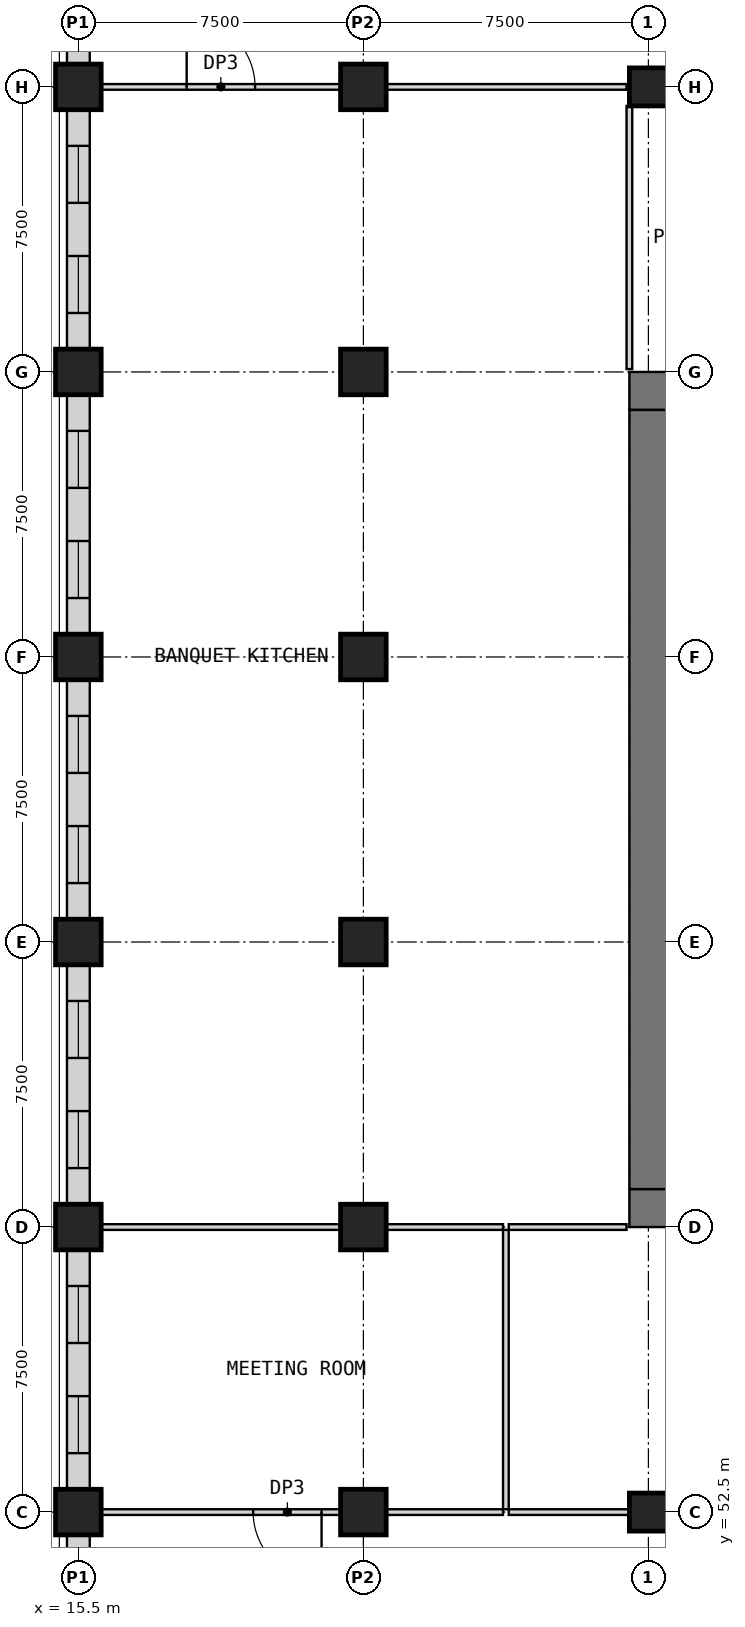
"""IFC4 building model, lengths in metres.
Left out: names, types, materials, properties, quantities, classifications, styles, units other than length and angle.
Written with IfcOpenShell. Run it as: python <this file> out.ifc"""

import sys

from ifc_helpers import new_model, si_unit, direction, frame, frame_2d, origin, origin_2d, place, context, subcontext, project, spatial, rectangle, extrude, element, fill, save


model = new_model("IFC4")
c1 = context("Model", 3, precision=1e-05, world=origin(), true_north=direction((0.0, 1.0)))
c2 = subcontext(c1, "Body", "Model", "MODEL_VIEW")
j1 = project(units=[si_unit("LENGTHUNIT", "METRE"), si_unit("PLANEANGLEUNIT", "RADIAN")], contexts=[c1])
p1 = place(None, origin())
s1 = spatial("IfcSite", under=j1, at=p1, CompositionType="ELEMENT")
p2 = place(p1, origin())
s2 = spatial("IfcBuilding", under=s1, at=p2, CompositionType="ELEMENT")
p3 = place(p2, frame((0.0, 0.0, 23.5)))
s3 = spatial("IfcBuildingStorey", under=s2, at=p3, CompositionType="ELEMENT", Elevation=23.5)
for number, where, z_axis, x_axis in (
    (1, (30.5, 52.5, 0.0), (0.0, 0.0, 1.0), (1.0, 0.0, 0.0)),
    (2, (30.5, 90.0, 0.0), (0.0, 0.0, 1.0), (1.0, 0.0, 0.0)),
):
    element("IfcColumn", number, at=place(p3, frame(where, z_axis=z_axis, x_axis=x_axis)), inside=s3, PredefinedType="COLUMN", context=c2, shape_type="SweptSolid", body=[
        extrude(rectangle(XDim=1.0, YDim=1.0, at=origin_2d()), origin(), (0.0, 0.0, 1.0), 5.5),
    ])
for number, where, z_axis, x_axis in (
    (3, (15.5, 52.5, 0.0), (0.0, 0.0, 1.0), (1.0, 0.0, 0.0)),
    (4, (15.5, 60.0, 0.0), (0.0, 0.0, 1.0), (1.0, 0.0, 0.0)),
    (5, (15.5, 67.5, 0.0), (0.0, 0.0, 1.0), (1.0, 0.0, 0.0)),
    (6, (15.5, 75.0, 0.0), (0.0, 0.0, 1.0), (1.0, 0.0, 0.0)),
    (7, (15.5, 82.5, 0.0), (0.0, 0.0, 1.0), (1.0, 0.0, 0.0)),
    (8, (15.5, 90.0, 0.0), (0.0, 0.0, 1.0), (1.0, 0.0, 0.0)),
    (9, (23.0, 52.5, 0.0), (0.0, 0.0, 1.0), (1.0, 0.0, 0.0)),
    (10, (23.0, 60.0, 0.0), (0.0, 0.0, 1.0), (1.0, 0.0, 0.0)),
    (11, (23.0, 67.5, 0.0), (0.0, 0.0, 1.0), (1.0, 0.0, 0.0)),
    (12, (23.0, 75.0, 0.0), (0.0, 0.0, 1.0), (1.0, 0.0, 0.0)),
    (13, (23.0, 82.5, 0.0), (0.0, 0.0, 1.0), (1.0, 0.0, 0.0)),
    (14, (23.0, 90.0, 0.0), (0.0, 0.0, 1.0), (1.0, 0.0, 0.0)),
):
    element("IfcColumn", number, at=place(p3, frame(where, z_axis=z_axis, x_axis=x_axis)), inside=s3, PredefinedType="COLUMN", context=c2, shape_type="SweptSolid", body=[
        extrude(rectangle(XDim=1.2, YDim=1.2, at=origin_2d()), origin(), (0.0, 0.0, 1.0), 5.5),
    ])
p4 = place(p3, frame((30.0, 60.5, 0.0), z_axis=(0.0, 0.0, 1.0), x_axis=(1.0, 0.0, 0.0)))
e15 = element("IfcWall", 15, at=p4, inside=s3, PredefinedType="SHEAR", context=c2, shape_type="SweptSolid", body=[
    extrude(rectangle(XDim=30.0, YDim=1.0, at=frame_2d((15.0, 0.0))), origin(), (0.0, 0.0, 1.0), 5.5),
])
p5 = place(p4, frame((21.9, 0.0, 0.0)))
e16 = element("IfcOpeningElement", 16, at=p5, cuts=e15, PredefinedType="OPENING", context=c2, shape_type="SweptSolid", body=[
    extrude(rectangle(XDim=1.8, YDim=2.1, at=frame_2d((0.9, 1.05))), frame((0.0, 0.51, 0.0), z_axis=(0.0, -1.0, 0.0), x_axis=(1.0, 0.0, 0.0)), (0.0, 0.0, 1.0), 1.02),
])
p6 = place(p4, frame((26.5, 0.0, 0.0)))
e17 = element("IfcOpeningElement", 17, at=p6, cuts=e15, PredefinedType="OPENING", context=c2, shape_type="SweptSolid", body=[
    extrude(rectangle(XDim=1.2, YDim=2.1, at=frame_2d((0.6, 1.05))), frame((0.0, 0.51, 0.0), z_axis=(0.0, -1.0, 0.0), x_axis=(1.0, 0.0, 0.0)), (0.0, 0.0, 1.0), 1.02),
])
p7 = place(p3, frame((30.0, 82.0, 0.0), z_axis=(0.0, 0.0, 1.0), x_axis=(1.0, 0.0, 0.0)))
e18 = element("IfcWall", 18, at=p7, inside=s3, PredefinedType="SHEAR", context=c2, shape_type="SweptSolid", body=[
    extrude(rectangle(XDim=30.0, YDim=1.0, at=frame_2d((15.0, 0.0))), origin(), (0.0, 0.0, 1.0), 5.5),
])
p8 = place(p3, frame((30.5, 61.0, 0.0), z_axis=(0.0, 0.0, 1.0), x_axis=(0.0, 1.0, 0.0)))
e19 = element("IfcWall", 19, at=p8, inside=s3, PredefinedType="SHEAR", context=c2, shape_type="SweptSolid", body=[
    extrude(rectangle(XDim=20.5, YDim=1.0, at=frame_2d((10.25, 0.0))), origin(), (0.0, 0.0, 1.0), 5.5),
])
p9 = place(p3, frame((22.4, 52.5, 0.0), z_axis=(0.0, 0.0, 1.0), x_axis=(-1.0, 0.0, 0.0)))
e20 = element("IfcWall", 20, at=p9, inside=s3, PredefinedType="PARTITIONING", context=c2, shape_type="SweptSolid", body=[
    extrude(rectangle(XDim=6.3, YDim=0.15, at=frame_2d((3.15, 0.0))), origin(), (0.0, 0.0, 1.0), 5.2),
])
p10 = place(p9, frame((0.5, 0.0, 0.0)))
e21 = element("IfcOpeningElement", 21, at=p10, cuts=e20, PredefinedType="OPENING", context=c2, shape_type="SweptSolid", body=[
    extrude(rectangle(XDim=1.8, YDim=2.4, at=frame_2d((0.9, 1.2))), frame((0.0, 0.085, 0.0), z_axis=(0.0, -1.0, 0.0), x_axis=(1.0, 0.0, 0.0)), (0.0, 0.0, 1.0), 0.17),
])
p11 = place(p3, frame((23.6, 52.5, 0.0), z_axis=(0.0, 0.0, 1.0), x_axis=(1.0, 0.0, 0.0)))
e22 = element("IfcWall", 22, at=p11, inside=s3, PredefinedType="PARTITIONING", context=c2, shape_type="SweptSolid", body=[
    extrude(rectangle(XDim=3.075, YDim=0.15, at=frame_2d((1.538, 0.0))), origin(), (0.0, 0.0, 1.0), 5.2),
])
p12 = place(p3, frame((26.825, 52.5, 0.0), z_axis=(0.0, 0.0, 1.0), x_axis=(1.0, 0.0, 0.0)))
e23 = element("IfcWall", 23, at=p12, inside=s3, PredefinedType="PARTITIONING", context=c2, shape_type="SweptSolid", body=[
    extrude(rectangle(XDim=3.175, YDim=0.15, at=frame_2d((1.587, 0.0))), origin(), (0.0, 0.0, 1.0), 5.2),
])
p13 = place(p3, frame((16.1, 60.0, 0.0), z_axis=(0.0, 0.0, 1.0), x_axis=(1.0, 0.0, 0.0)))
e24 = element("IfcWall", 24, at=p13, inside=s3, PredefinedType="PARTITIONING", context=c2, shape_type="SweptSolid", body=[
    extrude(rectangle(XDim=6.3, YDim=0.15, at=frame_2d((3.15, 0.0))), origin(), (0.0, 0.0, 1.0), 5.2),
])
p14 = place(p3, frame((23.6, 60.0, 0.0), z_axis=(0.0, 0.0, 1.0), x_axis=(1.0, 0.0, 0.0)))
e25 = element("IfcWall", 25, at=p14, inside=s3, PredefinedType="PARTITIONING", context=c2, shape_type="SweptSolid", body=[
    extrude(rectangle(XDim=3.075, YDim=0.15, at=frame_2d((1.538, 0.0))), origin(), (0.0, 0.0, 1.0), 5.2),
])
p15 = place(p3, frame((26.825, 60.0, 0.0), z_axis=(0.0, 0.0, 1.0), x_axis=(1.0, 0.0, 0.0)))
e26 = element("IfcWall", 26, at=p15, inside=s3, PredefinedType="PARTITIONING", context=c2, shape_type="SweptSolid", body=[
    extrude(rectangle(XDim=3.1, YDim=0.15, at=frame_2d((1.55, 0.0))), origin(), (0.0, 0.0, 1.0), 5.2),
])
p16 = place(p3, frame((16.1, 90.0, 0.0), z_axis=(0.0, 0.0, 1.0), x_axis=(1.0, 0.0, 0.0)))
e27 = element("IfcWall", 27, at=p16, inside=s3, PredefinedType="PARTITIONING", context=c2, shape_type="SweptSolid", body=[
    extrude(rectangle(XDim=6.3, YDim=0.15, at=frame_2d((3.15, 0.0))), origin(), (0.0, 0.0, 1.0), 5.2),
])
p17 = place(p16, frame((2.25, 0.0, 0.0)))
e28 = element("IfcOpeningElement", 28, at=p17, cuts=e27, PredefinedType="OPENING", context=c2, shape_type="SweptSolid", body=[
    extrude(rectangle(XDim=1.8, YDim=2.4, at=frame_2d((0.9, 1.2))), frame((0.0, 0.085, 0.0), z_axis=(0.0, -1.0, 0.0), x_axis=(1.0, 0.0, 0.0)), (0.0, 0.0, 1.0), 0.17),
])
p18 = place(p3, frame((23.6, 90.0, 0.0), z_axis=(0.0, 0.0, 1.0), x_axis=(1.0, 0.0, 0.0)))
e29 = element("IfcWall", 29, at=p18, inside=s3, PredefinedType="PARTITIONING", context=c2, shape_type="SweptSolid", body=[
    extrude(rectangle(XDim=6.325, YDim=0.15, at=frame_2d((3.163, 0.0))), origin(), (0.0, 0.0, 1.0), 5.2),
])
p19 = place(p3, frame((15.5, 46.1, 0.0), z_axis=(0.0, 0.0, 1.0), x_axis=(0.0, 1.0, 0.0)))
e30 = element("IfcWall", 30, at=p19, inside=s3, PredefinedType="PARTITIONING", context=c2, shape_type="SweptSolid", body=[
    extrude(rectangle(XDim=5.8, YDim=0.6, at=frame_2d((2.9, 0.0))), origin(), (0.0, 0.0, 1.0), 4.6),
])
p20 = place(p19, frame((0.816, 0.0, 0.9)))
e31 = element("IfcOpeningElement", 31, at=p20, cuts=e30, PredefinedType="OPENING", context=c2, shape_type="SweptSolid", body=[
    extrude(rectangle(XDim=1.5, YDim=2.8, at=frame_2d((0.75, 1.4))), frame((0.0, 0.31, 0.0), z_axis=(0.0, -1.0, 0.0), x_axis=(1.0, 0.0, 0.0)), (0.0, 0.0, 1.0), 0.62),
])
p21 = place(p19, frame((3.484, 0.0, 0.9)))
e32 = element("IfcOpeningElement", 32, at=p21, cuts=e30, PredefinedType="OPENING", context=c2, shape_type="SweptSolid", body=[
    extrude(rectangle(XDim=1.5, YDim=2.8, at=frame_2d((0.75, 1.4))), frame((0.0, 0.31, 0.0), z_axis=(0.0, -1.0, 0.0), x_axis=(1.0, 0.0, 0.0)), (0.0, 0.0, 1.0), 0.62),
])
p22 = place(p3, frame((15.5, 53.1, 0.0), z_axis=(0.0, 0.0, 1.0), x_axis=(0.0, 1.0, 0.0)))
e33 = element("IfcWall", 33, at=p22, inside=s3, PredefinedType="PARTITIONING", context=c2, shape_type="SweptSolid", body=[
    extrude(rectangle(XDim=6.3, YDim=0.6, at=frame_2d((3.15, 0.0))), origin(), (0.0, 0.0, 1.0), 4.6),
])
p23 = place(p22, frame((0.951, 0.0, 0.9)))
e34 = element("IfcOpeningElement", 34, at=p23, cuts=e33, PredefinedType="OPENING", context=c2, shape_type="SweptSolid", body=[
    extrude(rectangle(XDim=1.5, YDim=2.8, at=frame_2d((0.75, 1.4))), frame((0.0, 0.31, 0.0), z_axis=(0.0, -1.0, 0.0), x_axis=(1.0, 0.0, 0.0)), (0.0, 0.0, 1.0), 0.62),
])
p24 = place(p22, frame((3.849, 0.0, 0.9)))
e35 = element("IfcOpeningElement", 35, at=p24, cuts=e33, PredefinedType="OPENING", context=c2, shape_type="SweptSolid", body=[
    extrude(rectangle(XDim=1.5, YDim=2.8, at=frame_2d((0.75, 1.4))), frame((0.0, 0.31, 0.0), z_axis=(0.0, -1.0, 0.0), x_axis=(1.0, 0.0, 0.0)), (0.0, 0.0, 1.0), 0.62),
])
p25 = place(p3, frame((15.5, 60.6, 0.0), z_axis=(0.0, 0.0, 1.0), x_axis=(0.0, 1.0, 0.0)))
e36 = element("IfcWall", 36, at=p25, inside=s3, PredefinedType="PARTITIONING", context=c2, shape_type="SweptSolid", body=[
    extrude(rectangle(XDim=6.3, YDim=0.6, at=frame_2d((3.15, 0.0))), origin(), (0.0, 0.0, 1.0), 4.6),
])
p26 = place(p25, frame((0.951, 0.0, 0.9)))
e37 = element("IfcOpeningElement", 37, at=p26, cuts=e36, PredefinedType="OPENING", context=c2, shape_type="SweptSolid", body=[
    extrude(rectangle(XDim=1.5, YDim=2.8, at=frame_2d((0.75, 1.4))), frame((0.0, 0.31, 0.0), z_axis=(0.0, -1.0, 0.0), x_axis=(1.0, 0.0, 0.0)), (0.0, 0.0, 1.0), 0.62),
])
p27 = place(p25, frame((3.849, 0.0, 0.9)))
e38 = element("IfcOpeningElement", 38, at=p27, cuts=e36, PredefinedType="OPENING", context=c2, shape_type="SweptSolid", body=[
    extrude(rectangle(XDim=1.5, YDim=2.8, at=frame_2d((0.75, 1.4))), frame((0.0, 0.31, 0.0), z_axis=(0.0, -1.0, 0.0), x_axis=(1.0, 0.0, 0.0)), (0.0, 0.0, 1.0), 0.62),
])
p28 = place(p3, frame((15.5, 68.1, 0.0), z_axis=(0.0, 0.0, 1.0), x_axis=(0.0, 1.0, 0.0)))
e39 = element("IfcWall", 39, at=p28, inside=s3, PredefinedType="PARTITIONING", context=c2, shape_type="SweptSolid", body=[
    extrude(rectangle(XDim=6.3, YDim=0.6, at=frame_2d((3.15, 0.0))), origin(), (0.0, 0.0, 1.0), 4.6),
])
p29 = place(p28, frame((0.951, 0.0, 0.9)))
e40 = element("IfcOpeningElement", 40, at=p29, cuts=e39, PredefinedType="OPENING", context=c2, shape_type="SweptSolid", body=[
    extrude(rectangle(XDim=1.5, YDim=2.8, at=frame_2d((0.75, 1.4))), frame((0.0, 0.31, 0.0), z_axis=(0.0, -1.0, 0.0), x_axis=(1.0, 0.0, 0.0)), (0.0, 0.0, 1.0), 0.62),
])
p30 = place(p28, frame((3.849, 0.0, 0.9)))
e41 = element("IfcOpeningElement", 41, at=p30, cuts=e39, PredefinedType="OPENING", context=c2, shape_type="SweptSolid", body=[
    extrude(rectangle(XDim=1.5, YDim=2.8, at=frame_2d((0.75, 1.4))), frame((0.0, 0.31, 0.0), z_axis=(0.0, -1.0, 0.0), x_axis=(1.0, 0.0, 0.0)), (0.0, 0.0, 1.0), 0.62),
])
p31 = place(p3, frame((15.5, 75.6, 0.0), z_axis=(0.0, 0.0, 1.0), x_axis=(0.0, 1.0, 0.0)))
e42 = element("IfcWall", 42, at=p31, inside=s3, PredefinedType="PARTITIONING", context=c2, shape_type="SweptSolid", body=[
    extrude(rectangle(XDim=6.3, YDim=0.6, at=frame_2d((3.15, 0.0))), origin(), (0.0, 0.0, 1.0), 4.6),
])
p32 = place(p31, frame((0.951, 0.0, 0.9)))
e43 = element("IfcOpeningElement", 43, at=p32, cuts=e42, PredefinedType="OPENING", context=c2, shape_type="SweptSolid", body=[
    extrude(rectangle(XDim=1.5, YDim=2.8, at=frame_2d((0.75, 1.4))), frame((0.0, 0.31, 0.0), z_axis=(0.0, -1.0, 0.0), x_axis=(1.0, 0.0, 0.0)), (0.0, 0.0, 1.0), 0.62),
])
p33 = place(p31, frame((3.849, 0.0, 0.9)))
e44 = element("IfcOpeningElement", 44, at=p33, cuts=e42, PredefinedType="OPENING", context=c2, shape_type="SweptSolid", body=[
    extrude(rectangle(XDim=1.5, YDim=2.8, at=frame_2d((0.75, 1.4))), frame((0.0, 0.31, 0.0), z_axis=(0.0, -1.0, 0.0), x_axis=(1.0, 0.0, 0.0)), (0.0, 0.0, 1.0), 0.62),
])
p34 = place(p3, frame((15.5, 83.1, 0.0), z_axis=(0.0, 0.0, 1.0), x_axis=(0.0, 1.0, 0.0)))
e45 = element("IfcWall", 45, at=p34, inside=s3, PredefinedType="PARTITIONING", context=c2, shape_type="SweptSolid", body=[
    extrude(rectangle(XDim=6.3, YDim=0.6, at=frame_2d((3.15, 0.0))), origin(), (0.0, 0.0, 1.0), 4.6),
])
p35 = place(p34, frame((0.951, 0.0, 0.9)))
e46 = element("IfcOpeningElement", 46, at=p35, cuts=e45, PredefinedType="OPENING", context=c2, shape_type="SweptSolid", body=[
    extrude(rectangle(XDim=1.5, YDim=2.8, at=frame_2d((0.75, 1.4))), frame((0.0, 0.31, 0.0), z_axis=(0.0, -1.0, 0.0), x_axis=(1.0, 0.0, 0.0)), (0.0, 0.0, 1.0), 0.62),
])
p36 = place(p34, frame((3.849, 0.0, 0.9)))
e47 = element("IfcOpeningElement", 47, at=p36, cuts=e45, PredefinedType="OPENING", context=c2, shape_type="SweptSolid", body=[
    extrude(rectangle(XDim=1.5, YDim=2.8, at=frame_2d((0.75, 1.4))), frame((0.0, 0.31, 0.0), z_axis=(0.0, -1.0, 0.0), x_axis=(1.0, 0.0, 0.0)), (0.0, 0.0, 1.0), 0.62),
])
p37 = place(p3, frame((15.5, 90.6, 0.0), z_axis=(0.0, 0.0, 1.0), x_axis=(0.0, 1.0, 0.0)))
e48 = element("IfcWall", 48, at=p37, inside=s3, PredefinedType="PARTITIONING", context=c2, shape_type="SweptSolid", body=[
    extrude(rectangle(XDim=5.8, YDim=0.6, at=frame_2d((2.9, 0.0))), origin(), (0.0, 0.0, 1.0), 4.6),
])
p38 = place(p37, frame((0.816, 0.0, 0.9)))
e49 = element("IfcOpeningElement", 49, at=p38, cuts=e48, PredefinedType="OPENING", context=c2, shape_type="SweptSolid", body=[
    extrude(rectangle(XDim=1.5, YDim=2.8, at=frame_2d((0.75, 1.4))), frame((0.0, 0.31, 0.0), z_axis=(0.0, -1.0, 0.0), x_axis=(1.0, 0.0, 0.0)), (0.0, 0.0, 1.0), 0.62),
])
p39 = place(p37, frame((3.484, 0.0, 0.9)))
e50 = element("IfcOpeningElement", 50, at=p39, cuts=e48, PredefinedType="OPENING", context=c2, shape_type="SweptSolid", body=[
    extrude(rectangle(XDim=1.5, YDim=2.8, at=frame_2d((0.75, 1.4))), frame((0.0, 0.31, 0.0), z_axis=(0.0, -1.0, 0.0), x_axis=(1.0, 0.0, 0.0)), (0.0, 0.0, 1.0), 0.62),
])
p40 = place(p3, frame((26.75, 52.575, 0.0), z_axis=(0.0, 0.0, 1.0), x_axis=(0.0, 1.0, 0.0)))
e51 = element("IfcWall", 51, at=p40, inside=s3, PredefinedType="PARTITIONING", context=c2, shape_type="SweptSolid", body=[
    extrude(rectangle(XDim=7.35, YDim=0.15, at=frame_2d((3.675, 0.0))), origin(), (0.0, 0.0, 1.0), 5.2),
])
p41 = place(p3, frame((30.0, 82.575, 0.0), z_axis=(0.0, 0.0, 1.0), x_axis=(0.0, 1.0, 0.0)))
e52 = element("IfcWall", 52, at=p41, inside=s3, PredefinedType="PARTITIONING", context=c2, shape_type="SweptSolid", body=[
    extrude(rectangle(XDim=6.925, YDim=0.15, at=frame_2d((3.462, 0.0))), origin(), (0.0, 0.0, 1.0), 5.2),
])
p42 = place(p10, origin())
e53 = element("IfcDoor", 53, at=p42, inside=s3, OperationType="SINGLE_SWING_LEFT", PredefinedType="DOOR", context=c2, shape_type="SweptSolid", body=[
    extrude(rectangle(XDim=1.8, YDim=2.4, at=frame_2d((0.9, 1.2))), frame((0.0, 0.025, 0.0), z_axis=(0.0, -1.0, 0.0), x_axis=(1.0, 0.0, 0.0)), (0.0, 0.0, 1.0), 0.05),
])
fill(e21, e53)
p43 = place(p17, origin())
e54 = element("IfcDoor", 54, at=p43, inside=s3, OperationType="SINGLE_SWING_LEFT", PredefinedType="DOOR", context=c2, shape_type="SweptSolid", body=[
    extrude(rectangle(XDim=1.8, YDim=2.4, at=frame_2d((0.9, 1.2))), frame((0.0, 0.025, 0.0), z_axis=(0.0, -1.0, 0.0), x_axis=(1.0, 0.0, 0.0)), (0.0, 0.0, 1.0), 0.05),
])
fill(e28, e54)
p44 = place(p23, origin())
e55 = element("IfcWindow", 55, at=p44, inside=s3, PartitioningType="SINGLE_PANEL", PredefinedType="WINDOW", context=c2, shape_type="SweptSolid", body=[
    extrude(rectangle(XDim=1.5, YDim=2.8, at=frame_2d((0.75, 1.4))), frame((0.0, 0.03, 0.0), z_axis=(0.0, -1.0, 0.0), x_axis=(1.0, 0.0, 0.0)), (0.0, 0.0, 1.0), 0.06),
])
fill(e34, e55)
p45 = place(p24, origin())
e56 = element("IfcWindow", 56, at=p45, inside=s3, PartitioningType="SINGLE_PANEL", PredefinedType="WINDOW", context=c2, shape_type="SweptSolid", body=[
    extrude(rectangle(XDim=1.5, YDim=2.8, at=frame_2d((0.75, 1.4))), frame((0.0, 0.03, 0.0), z_axis=(0.0, -1.0, 0.0), x_axis=(1.0, 0.0, 0.0)), (0.0, 0.0, 1.0), 0.06),
])
fill(e35, e56)
p46 = place(p26, origin())
e57 = element("IfcWindow", 57, at=p46, inside=s3, PartitioningType="SINGLE_PANEL", PredefinedType="WINDOW", context=c2, shape_type="SweptSolid", body=[
    extrude(rectangle(XDim=1.5, YDim=2.8, at=frame_2d((0.75, 1.4))), frame((0.0, 0.03, 0.0), z_axis=(0.0, -1.0, 0.0), x_axis=(1.0, 0.0, 0.0)), (0.0, 0.0, 1.0), 0.06),
])
fill(e37, e57)
p47 = place(p27, origin())
e58 = element("IfcWindow", 58, at=p47, inside=s3, PartitioningType="SINGLE_PANEL", PredefinedType="WINDOW", context=c2, shape_type="SweptSolid", body=[
    extrude(rectangle(XDim=1.5, YDim=2.8, at=frame_2d((0.75, 1.4))), frame((0.0, 0.03, 0.0), z_axis=(0.0, -1.0, 0.0), x_axis=(1.0, 0.0, 0.0)), (0.0, 0.0, 1.0), 0.06),
])
fill(e38, e58)
p48 = place(p29, origin())
e59 = element("IfcWindow", 59, at=p48, inside=s3, PartitioningType="SINGLE_PANEL", PredefinedType="WINDOW", context=c2, shape_type="SweptSolid", body=[
    extrude(rectangle(XDim=1.5, YDim=2.8, at=frame_2d((0.75, 1.4))), frame((0.0, 0.03, 0.0), z_axis=(0.0, -1.0, 0.0), x_axis=(1.0, 0.0, 0.0)), (0.0, 0.0, 1.0), 0.06),
])
fill(e40, e59)
p49 = place(p30, origin())
e60 = element("IfcWindow", 60, at=p49, inside=s3, PartitioningType="SINGLE_PANEL", PredefinedType="WINDOW", context=c2, shape_type="SweptSolid", body=[
    extrude(rectangle(XDim=1.5, YDim=2.8, at=frame_2d((0.75, 1.4))), frame((0.0, 0.03, 0.0), z_axis=(0.0, -1.0, 0.0), x_axis=(1.0, 0.0, 0.0)), (0.0, 0.0, 1.0), 0.06),
])
fill(e41, e60)
p50 = place(p32, origin())
e61 = element("IfcWindow", 61, at=p50, inside=s3, PartitioningType="SINGLE_PANEL", PredefinedType="WINDOW", context=c2, shape_type="SweptSolid", body=[
    extrude(rectangle(XDim=1.5, YDim=2.8, at=frame_2d((0.75, 1.4))), frame((0.0, 0.03, 0.0), z_axis=(0.0, -1.0, 0.0), x_axis=(1.0, 0.0, 0.0)), (0.0, 0.0, 1.0), 0.06),
])
fill(e43, e61)
p51 = place(p33, origin())
e62 = element("IfcWindow", 62, at=p51, inside=s3, PartitioningType="SINGLE_PANEL", PredefinedType="WINDOW", context=c2, shape_type="SweptSolid", body=[
    extrude(rectangle(XDim=1.5, YDim=2.8, at=frame_2d((0.75, 1.4))), frame((0.0, 0.03, 0.0), z_axis=(0.0, -1.0, 0.0), x_axis=(1.0, 0.0, 0.0)), (0.0, 0.0, 1.0), 0.06),
])
fill(e44, e62)
p52 = place(p35, origin())
e63 = element("IfcWindow", 63, at=p52, inside=s3, PartitioningType="SINGLE_PANEL", PredefinedType="WINDOW", context=c2, shape_type="SweptSolid", body=[
    extrude(rectangle(XDim=1.5, YDim=2.8, at=frame_2d((0.75, 1.4))), frame((0.0, 0.03, 0.0), z_axis=(0.0, -1.0, 0.0), x_axis=(1.0, 0.0, 0.0)), (0.0, 0.0, 1.0), 0.06),
])
fill(e46, e63)
p53 = place(p36, origin())
e64 = element("IfcWindow", 64, at=p53, inside=s3, PartitioningType="SINGLE_PANEL", PredefinedType="WINDOW", context=c2, shape_type="SweptSolid", body=[
    extrude(rectangle(XDim=1.5, YDim=2.8, at=frame_2d((0.75, 1.4))), frame((0.0, 0.03, 0.0), z_axis=(0.0, -1.0, 0.0), x_axis=(1.0, 0.0, 0.0)), (0.0, 0.0, 1.0), 0.06),
])
fill(e47, e64)
save(model, sys.argv[1])
